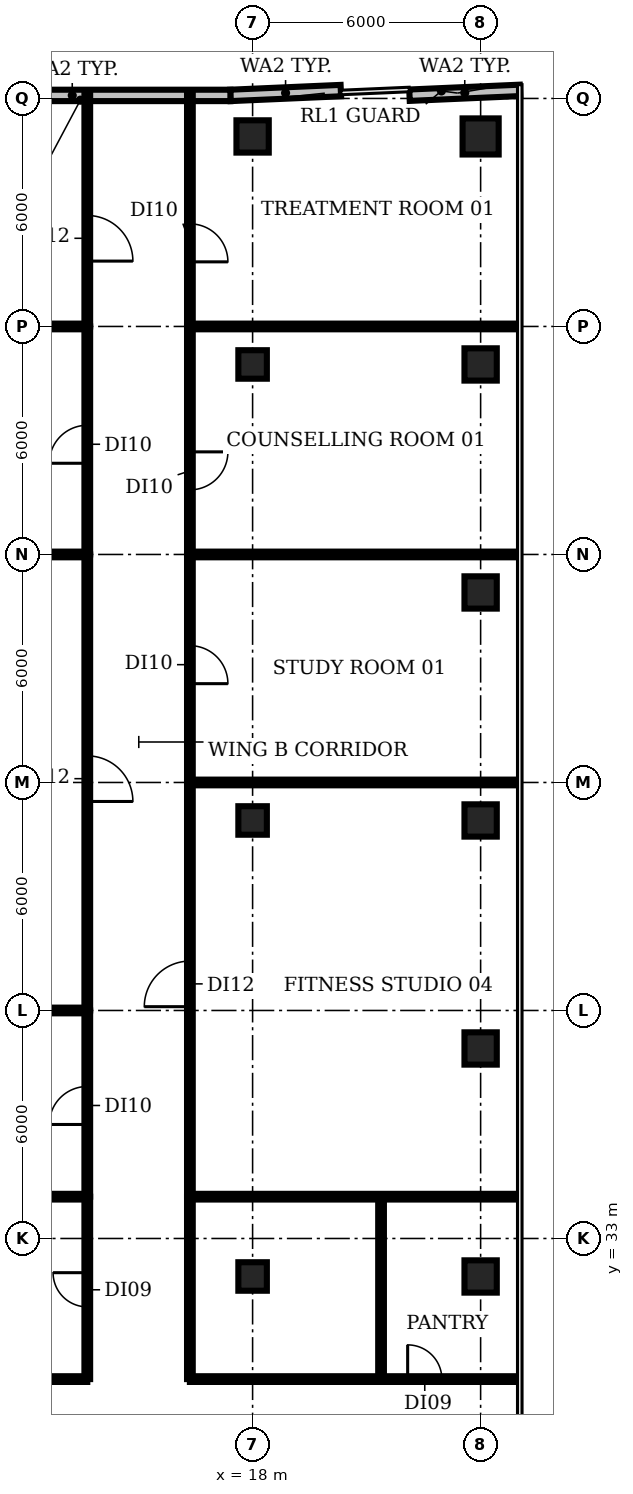
"""IFC4 building model, lengths in metres.
Left out: names, types, materials, properties, quantities, classifications, styles, units other than length and angle.
Written with IfcOpenShell. Run it as: python <this file> out.ifc"""

import sys

from ifc_helpers import new_model, si_unit, direction, frame, frame_2d, origin, origin_2d, place, context, subcontext, project, spatial, rectangle, circle, extrude, element, fill, save


model = new_model("IFC4")
c1 = context("Model", 3, precision=1e-05, world=origin(), true_north=direction((0.0, 1.0)))
c2 = subcontext(c1, "Body", "Model", "MODEL_VIEW")
j1 = project(units=[si_unit("LENGTHUNIT", "METRE"), si_unit("PLANEANGLEUNIT", "RADIAN")], contexts=[c1])
p1 = place(None, origin())
s1 = spatial("IfcSite", under=j1, at=p1, CompositionType="ELEMENT")
p2 = place(p1, origin())
s2 = spatial("IfcBuilding", under=s1, at=p2, CompositionType="ELEMENT")
p3 = place(p2, frame((0.0, 0.0, 180.2)))
s3 = spatial("IfcBuildingStorey", under=s2, at=p3, CompositionType="ELEMENT", Elevation=180.2)
for number, where, z_axis, x_axis in (
    (1, (18.0, 32.0, 0.0), (0.0, 0.0, 1.0), (1.0, 0.0, 0.0)),
    (2, (18.0, 44.0, 0.0), (0.0, 0.0, 1.0), (1.0, 0.0, 0.0)),
    (3, (18.0, 56.0, 0.0), (0.0, 0.0, 1.0), (1.0, 0.0, 0.0)),
):
    element("IfcColumn", number, at=place(p3, frame(where, z_axis=z_axis, x_axis=x_axis)), inside=s3, PredefinedType="COLUMN", context=c2, shape_type="SweptSolid", body=[
        extrude(rectangle(XDim=0.75, YDim=0.75, at=origin_2d()), origin(), (0.0, 0.0, 1.0), 3.85),
    ])
for number, where, z_axis, x_axis in (
    (4, (18.0, 62.0, 0.0), (0.0, 0.0, 1.0), (1.0, 0.0, 0.0)),
    (5, (24.0, 32.0, 0.0), (0.0, 0.0, 1.0), (1.0, 0.0, 0.0)),
    (6, (24.0, 38.0, 0.0), (0.0, 0.0, 1.0), (1.0, 0.0, 0.0)),
    (7, (24.0, 44.0, 0.0), (0.0, 0.0, 1.0), (1.0, 0.0, 0.0)),
    (8, (24.0, 50.0, 0.0), (0.0, 0.0, 1.0), (1.0, 0.0, 0.0)),
    (9, (24.0, 56.0, 0.0), (0.0, 0.0, 1.0), (1.0, 0.0, 0.0)),
):
    element("IfcColumn", number, at=place(p3, frame(where, z_axis=z_axis, x_axis=x_axis)), inside=s3, PredefinedType="COLUMN", context=c2, shape_type="SweptSolid", body=[
        extrude(rectangle(XDim=0.85, YDim=0.85, at=origin_2d()), origin(), (0.0, 0.0, 1.0), 3.85),
    ])
p4 = place(p3, frame((24.0, 62.0, 0.0), z_axis=(0.0, 0.0, 1.0), x_axis=(1.0, 0.0, 0.0)))
e10 = element("IfcColumn", 10, at=p4, inside=s3, PredefinedType="COLUMN", context=c2, shape_type="SweptSolid", body=[
    extrude(circle(Radius=0.475, at=origin_2d()), origin(), (0.0, 0.0, 1.0), 3.85),
])
p5 = place(p3, frame((25.037, 63.213, 0.0), z_axis=(0.0, 0.0, 1.0), x_axis=(-0.999048387851, -0.043615579018, 0.0)))
e11 = element("IfcWall", 11, at=p5, inside=s3, PredefinedType="SOLIDWALL", context=c2, shape_type="SweptSolid", body=[
    extrude(rectangle(XDim=2.911, YDim=0.3, at=frame_2d((1.455, 0.0))), origin(), (0.0, 0.0, 1.0), 3.85),
])
p6 = place(p3, frame((20.322, 63.207, 0.0), z_axis=(0.0, 0.0, 1.0), x_axis=(-0.999051880213, -0.043535510145, 0.0)))
e12 = element("IfcWall", 12, at=p6, inside=s3, PredefinedType="SOLIDWALL", context=c2, shape_type="SweptSolid", body=[
    extrude(rectangle(XDim=2.91, YDim=0.3, at=frame_2d((1.455, 0.0))), origin(), (0.0, 0.0, 1.0), 3.85),
])
p7 = place(p3, frame((17.416, 63.08, 0.0), z_axis=(0.0, 0.0, 1.0), x_axis=(-1.0, 0.0, 0.0)))
e13 = element("IfcWall", 13, at=p7, inside=s3, PredefinedType="SOLIDWALL", context=c2, shape_type="SweptSolid", body=[
    extrude(rectangle(XDim=8.323, YDim=0.3, at=frame_2d((4.162, 0.0))), origin(), (0.0, 0.0, 1.0), 3.85),
])
p8 = place(p3, frame((-2.33, 57.0, 0.0), z_axis=(0.0, 0.0, 1.0), x_axis=(1.0, 0.0, 0.0)))
e14 = element("IfcWall", 14, at=p8, inside=s3, PredefinedType="PARTITIONING", context=c2, shape_type="SweptSolid", body=[
    extrude(rectangle(XDim=15.98, YDim=0.15, at=frame_2d((7.99, 0.0))), origin(), (0.0, 0.0, 1.0), 2.88),
])
p9 = place(p3, frame((-2.07, 51.0, 0.0), z_axis=(0.0, 0.0, 1.0), x_axis=(1.0, 0.0, 0.0)))
e15 = element("IfcWall", 15, at=p9, inside=s3, PredefinedType="PARTITIONING", context=c2, shape_type="SweptSolid", body=[
    extrude(rectangle(XDim=15.72, YDim=0.15, at=frame_2d((7.86, 0.0))), origin(), (0.0, 0.0, 1.0), 2.88),
])
p10 = place(p3, frame((-1.55, 39.0, 0.0), z_axis=(0.0, 0.0, 1.0), x_axis=(1.0, 0.0, 0.0)))
e16 = element("IfcWall", 16, at=p10, inside=s3, PredefinedType="PARTITIONING", context=c2, shape_type="SweptSolid", body=[
    extrude(rectangle(XDim=15.2, YDim=0.15, at=frame_2d((7.6, 0.0))), origin(), (0.0, 0.0, 1.0), 2.88),
])
p11 = place(p3, frame((-1.33, 34.1, 0.0), z_axis=(0.0, 0.0, 1.0), x_axis=(1.0, 0.0, 0.0)))
e17 = element("IfcWall", 17, at=p11, inside=s3, PredefinedType="PARTITIONING", context=c2, shape_type="SweptSolid", body=[
    extrude(rectangle(XDim=14.98, YDim=0.15, at=frame_2d((7.49, 0.0))), origin(), (0.0, 0.0, 1.0), 2.88),
])
p12 = place(p3, frame((8.8, 29.3, 0.0), z_axis=(0.0, 0.0, 1.0), x_axis=(1.0, 0.0, 0.0)))
e18 = element("IfcWall", 18, at=p12, inside=s3, PredefinedType="PARTITIONING", context=c2, shape_type="SweptSolid", body=[
    extrude(rectangle(XDim=4.85, YDim=0.15, at=frame_2d((2.425, 0.0))), origin(), (0.0, 0.0, 1.0), 2.88),
])
p13 = place(p3, frame((13.65, 29.3, 0.0), z_axis=(0.0, 0.0, 1.0), x_axis=(0.0, 1.0, 0.0)))
e19 = element("IfcWall", 19, at=p13, inside=s3, PredefinedType="PARTITIONING", context=c2, shape_type="SweptSolid", body=[
    extrude(rectangle(XDim=4.8, YDim=0.15, at=frame_2d((2.4, 0.0))), origin(), (0.0, 0.0, 1.0), 2.88),
])
p14 = place(p13, frame((1.9, 0.0, 0.0)))
e20 = element("IfcOpeningElement", 20, at=p14, cuts=e19, PredefinedType="OPENING", context=c2, shape_type="SweptSolid", body=[
    extrude(rectangle(XDim=0.9, YDim=2.1, at=frame_2d((0.45, 1.05))), frame((0.0, 0.085, 0.0), z_axis=(0.0, -1.0, 0.0), x_axis=(1.0, 0.0, 0.0)), (0.0, 0.0, 1.0), 0.17),
])
p15 = place(p3, frame((13.65, 34.1, 0.0), z_axis=(0.0, 0.0, 1.0), x_axis=(0.0, 1.0, 0.0)))
e21 = element("IfcWall", 21, at=p15, inside=s3, PredefinedType="PARTITIONING", context=c2, shape_type="SweptSolid", body=[
    extrude(rectangle(XDim=4.9, YDim=0.15, at=frame_2d((2.45, 0.0))), origin(), (0.0, 0.0, 1.0), 2.88),
])
p16 = place(p15, frame((1.9, 0.0, 0.0)))
e22 = element("IfcOpeningElement", 22, at=p16, cuts=e21, PredefinedType="OPENING", context=c2, shape_type="SweptSolid", body=[
    extrude(rectangle(XDim=1.0, YDim=2.1, at=frame_2d((0.5, 1.05))), frame((0.0, 0.085, 0.0), z_axis=(0.0, -1.0, 0.0), x_axis=(1.0, 0.0, 0.0)), (0.0, 0.0, 1.0), 0.17),
])
p17 = place(p3, frame((13.65, 51.0, 0.0), z_axis=(0.0, 0.0, 1.0), x_axis=(0.0, -1.0, 0.0)))
e23 = element("IfcWall", 23, at=p17, inside=s3, PredefinedType="PARTITIONING", context=c2, shape_type="SweptSolid", body=[
    extrude(rectangle(XDim=12.0, YDim=0.15, at=frame_2d((6.0, 0.0))), origin(), (0.0, 0.0, 1.0), 2.88),
])
p18 = place(p17, frame((5.3, 0.0, 0.0)))
e24 = element("IfcOpeningElement", 24, at=p18, cuts=e23, PredefinedType="OPENING", context=c2, shape_type="SweptSolid", body=[
    extrude(rectangle(XDim=1.2, YDim=2.1, at=frame_2d((0.6, 1.05))), frame((0.0, 0.085, 0.0), z_axis=(0.0, -1.0, 0.0), x_axis=(1.0, 0.0, 0.0)), (0.0, 0.0, 1.0), 0.17),
])
p19 = place(p3, frame((13.65, 51.0, 0.0), z_axis=(0.0, 0.0, 1.0), x_axis=(0.0, 1.0, 0.0)))
e25 = element("IfcWall", 25, at=p19, inside=s3, PredefinedType="PARTITIONING", context=c2, shape_type="SweptSolid", body=[
    extrude(rectangle(XDim=6.0, YDim=0.15, at=frame_2d((3.0, 0.0))), origin(), (0.0, 0.0, 1.0), 2.88),
])
p20 = place(p19, frame((2.4, 0.0, 0.0)))
e26 = element("IfcOpeningElement", 26, at=p20, cuts=e25, PredefinedType="OPENING", context=c2, shape_type="SweptSolid", body=[
    extrude(rectangle(XDim=1.0, YDim=2.1, at=frame_2d((0.5, 1.05))), frame((0.0, 0.085, 0.0), z_axis=(0.0, -1.0, 0.0), x_axis=(1.0, 0.0, 0.0)), (0.0, 0.0, 1.0), 0.17),
])
p21 = place(p3, frame((13.65, 63.09, 0.0), z_axis=(0.0, 0.0, 1.0), x_axis=(0.0, -1.0, 0.0)))
e27 = element("IfcWall", 27, at=p21, inside=s3, PredefinedType="PARTITIONING", context=c2, shape_type="SweptSolid", body=[
    extrude(rectangle(XDim=6.09, YDim=0.15, at=frame_2d((3.045, 0.0))), origin(), (0.0, 0.0, 1.0), 2.88),
])
p22 = place(p21, frame((3.17, 0.0, 0.0)))
e28 = element("IfcOpeningElement", 28, at=p22, cuts=e27, PredefinedType="OPENING", context=c2, shape_type="SweptSolid", body=[
    extrude(rectangle(XDim=1.2, YDim=2.1, at=frame_2d((0.6, 1.05))), frame((0.0, 0.085, 0.0), z_axis=(0.0, -1.0, 0.0), x_axis=(1.0, 0.0, 0.0)), (0.0, 0.0, 1.0), 0.17),
])
p23 = place(p3, frame((16.35, 29.3, 0.0), z_axis=(0.0, 0.0, 1.0), x_axis=(0.0, 1.0, 0.0)))
e29 = element("IfcWall", 29, at=p23, inside=s3, PredefinedType="PARTITIONING", context=c2, shape_type="SweptSolid", body=[
    extrude(rectangle(XDim=4.8, YDim=0.15, at=frame_2d((2.4, 0.0))), origin(), (0.0, 0.0, 1.0), 2.88),
])
p24 = place(p3, frame((16.35, 29.3, 0.0), z_axis=(0.0, 0.0, 1.0), x_axis=(1.0, 0.0, 0.0)))
e30 = element("IfcWall", 30, at=p24, inside=s3, PredefinedType="PARTITIONING", context=c2, shape_type="SweptSolid", body=[
    extrude(rectangle(XDim=5.03, YDim=0.15, at=frame_2d((2.515, 0.0))), origin(), (0.0, 0.0, 1.0), 2.88),
])
p25 = place(p3, frame((16.35, 34.1, 0.0), z_axis=(0.0, 0.0, 1.0), x_axis=(0.0, 1.0, 0.0)))
e31 = element("IfcWall", 31, at=p25, inside=s3, PredefinedType="PARTITIONING", context=c2, shape_type="SweptSolid", body=[
    extrude(rectangle(XDim=10.9, YDim=0.15, at=frame_2d((5.45, 0.0))), origin(), (0.0, 0.0, 1.0), 2.88),
])
p26 = place(p25, frame((5.0, 0.0, 0.0)))
e32 = element("IfcOpeningElement", 32, at=p26, cuts=e31, PredefinedType="OPENING", context=c2, shape_type="SweptSolid", body=[
    extrude(rectangle(XDim=1.2, YDim=2.1, at=frame_2d((0.6, 1.05))), frame((0.0, 0.085, 0.0), z_axis=(0.0, -1.0, 0.0), x_axis=(1.0, 0.0, 0.0)), (0.0, 0.0, 1.0), 0.17),
])
p27 = place(p3, frame((16.35, 34.1, 0.0), z_axis=(0.0, 0.0, 1.0), x_axis=(1.0, 0.0, 0.0)))
e33 = element("IfcWall", 33, at=p27, inside=s3, PredefinedType="PARTITIONING", context=c2, shape_type="SweptSolid", body=[
    extrude(rectangle(XDim=8.63, YDim=0.15, at=frame_2d((4.315, 0.0))), origin(), (0.0, 0.0, 1.0), 2.88),
])
p28 = place(p3, frame((16.35, 45.0, 0.0), z_axis=(0.0, 0.0, 1.0), x_axis=(1.0, 0.0, 0.0)))
e34 = element("IfcWall", 34, at=p28, inside=s3, PredefinedType="PARTITIONING", context=c2, shape_type="SweptSolid", body=[
    extrude(rectangle(XDim=8.615, YDim=0.15, at=frame_2d((4.308, 0.0))), origin(), (0.0, 0.0, 1.0), 2.88),
])
p29 = place(p3, frame((16.35, 51.0, 0.0), z_axis=(0.0, 0.0, 1.0), x_axis=(0.0, -1.0, 0.0)))
e35 = element("IfcWall", 35, at=p29, inside=s3, PredefinedType="PARTITIONING", context=c2, shape_type="SweptSolid", body=[
    extrude(rectangle(XDim=6.0, YDim=0.15, at=frame_2d((3.0, 0.0))), origin(), (0.0, 0.0, 1.0), 2.88),
])
p30 = place(p29, frame((2.4, 0.0, 0.0)))
e36 = element("IfcOpeningElement", 36, at=p30, cuts=e35, PredefinedType="OPENING", context=c2, shape_type="SweptSolid", body=[
    extrude(rectangle(XDim=1.0, YDim=2.1, at=frame_2d((0.5, 1.05))), frame((0.0, 0.085, 0.0), z_axis=(0.0, -1.0, 0.0), x_axis=(1.0, 0.0, 0.0)), (0.0, 0.0, 1.0), 0.17),
])
p31 = place(p3, frame((16.35, 51.0, 0.0), z_axis=(0.0, 0.0, 1.0), x_axis=(1.0, 0.0, 0.0)))
e37 = element("IfcWall", 37, at=p31, inside=s3, PredefinedType="PARTITIONING", context=c2, shape_type="SweptSolid", body=[
    extrude(rectangle(XDim=8.63, YDim=0.15, at=frame_2d((4.315, 0.0))), origin(), (0.0, 0.0, 1.0), 2.88),
])
p32 = place(p3, frame((16.35, 57.0, 0.0), z_axis=(0.0, 0.0, 1.0), x_axis=(0.0, -1.0, 0.0)))
e38 = element("IfcWall", 38, at=p32, inside=s3, PredefinedType="PARTITIONING", context=c2, shape_type="SweptSolid", body=[
    extrude(rectangle(XDim=6.0, YDim=0.15, at=frame_2d((3.0, 0.0))), origin(), (0.0, 0.0, 1.0), 2.88),
])
p33 = place(p32, frame((3.3, 0.0, 0.0)))
e39 = element("IfcOpeningElement", 39, at=p33, cuts=e38, PredefinedType="OPENING", context=c2, shape_type="SweptSolid", body=[
    extrude(rectangle(XDim=1.0, YDim=2.1, at=frame_2d((0.5, 1.05))), frame((0.0, 0.085, 0.0), z_axis=(0.0, -1.0, 0.0), x_axis=(1.0, 0.0, 0.0)), (0.0, 0.0, 1.0), 0.17),
])
p34 = place(p3, frame((16.35, 57.0, 0.0), z_axis=(0.0, 0.0, 1.0), x_axis=(1.0, 0.0, 0.0)))
e40 = element("IfcWall", 40, at=p34, inside=s3, PredefinedType="PARTITIONING", context=c2, shape_type="SweptSolid", body=[
    extrude(rectangle(XDim=8.63, YDim=0.15, at=frame_2d((4.315, 0.0))), origin(), (0.0, 0.0, 1.0), 2.88),
])
p35 = place(p3, frame((16.35, 63.09, 0.0), z_axis=(0.0, 0.0, 1.0), x_axis=(0.0, -1.0, 0.0)))
e41 = element("IfcWall", 41, at=p35, inside=s3, PredefinedType="PARTITIONING", context=c2, shape_type="SweptSolid", body=[
    extrude(rectangle(XDim=6.09, YDim=0.15, at=frame_2d((3.045, 0.0))), origin(), (0.0, 0.0, 1.0), 2.88),
])
p36 = place(p35, frame((3.39, 0.0, 0.0)))
e42 = element("IfcOpeningElement", 42, at=p36, cuts=e41, PredefinedType="OPENING", context=c2, shape_type="SweptSolid", body=[
    extrude(rectangle(XDim=1.0, YDim=2.1, at=frame_2d((0.5, 1.05))), frame((0.0, 0.085, 0.0), z_axis=(0.0, -1.0, 0.0), x_axis=(1.0, 0.0, 0.0)), (0.0, 0.0, 1.0), 0.17),
])
p37 = place(p3, frame((21.38, 29.3, 0.0), z_axis=(0.0, 0.0, 1.0), x_axis=(0.0, 1.0, 0.0)))
e43 = element("IfcWall", 43, at=p37, inside=s3, PredefinedType="PARTITIONING", context=c2, shape_type="SweptSolid", body=[
    extrude(rectangle(XDim=4.8, YDim=0.15, at=frame_2d((2.4, 0.0))), origin(), (0.0, 0.0, 1.0), 2.88),
])
p38 = place(p3, frame((21.38, 29.3, 0.0), z_axis=(0.0, 0.0, 1.0), x_axis=(1.0, 0.0, 0.0)))
e44 = element("IfcWall", 44, at=p38, inside=s3, PredefinedType="PARTITIONING", context=c2, shape_type="SweptSolid", body=[
    extrude(rectangle(XDim=3.6, YDim=0.15, at=frame_2d((1.8, 0.0))), origin(), (0.0, 0.0, 1.0), 2.88),
])
p39 = place(p38, frame((0.7, 0.0, 0.0)))
e45 = element("IfcOpeningElement", 45, at=p39, cuts=e44, PredefinedType="OPENING", context=c2, shape_type="SweptSolid", body=[
    extrude(rectangle(XDim=0.9, YDim=2.1, at=frame_2d((0.45, 1.05))), frame((0.0, 0.085, 0.0), z_axis=(0.0, -1.0, 0.0), x_axis=(1.0, 0.0, 0.0)), (0.0, 0.0, 1.0), 0.17),
])
p40 = place(p14, origin())
e46 = element("IfcDoor", 46, at=p40, inside=s3, OperationType="SINGLE_SWING_RIGHT", PredefinedType="DOOR", context=c2, shape_type="SweptSolid", body=[
    extrude(rectangle(XDim=0.9, YDim=2.1, at=frame_2d((0.45, 1.05))), frame((0.0, 0.025, 0.0), z_axis=(0.0, -1.0, 0.0), x_axis=(1.0, 0.0, 0.0)), (0.0, 0.0, 1.0), 0.05),
])
fill(e20, e46)
p41 = place(p16, origin())
e47 = element("IfcDoor", 47, at=p41, inside=s3, OperationType="SINGLE_SWING_LEFT", PredefinedType="DOOR", context=c2, shape_type="SweptSolid", body=[
    extrude(rectangle(XDim=1.0, YDim=2.1, at=frame_2d((0.5, 1.05))), frame((0.0, 0.025, 0.0), z_axis=(0.0, -1.0, 0.0), x_axis=(1.0, 0.0, 0.0)), (0.0, 0.0, 1.0), 0.05),
])
fill(e22, e47)
p42 = place(p18, origin())
e48 = element("IfcDoor", 48, at=p42, inside=s3, OperationType="SINGLE_SWING_RIGHT", PredefinedType="DOOR", context=c2, shape_type="SweptSolid", body=[
    extrude(rectangle(XDim=1.2, YDim=2.1, at=frame_2d((0.6, 1.05))), frame((0.0, 0.025, 0.0), z_axis=(0.0, -1.0, 0.0), x_axis=(1.0, 0.0, 0.0)), (0.0, 0.0, 1.0), 0.05),
])
fill(e24, e48)
p43 = place(p20, origin())
e49 = element("IfcDoor", 49, at=p43, inside=s3, OperationType="SINGLE_SWING_LEFT", PredefinedType="DOOR", context=c2, shape_type="SweptSolid", body=[
    extrude(rectangle(XDim=1.0, YDim=2.1, at=frame_2d((0.5, 1.05))), frame((0.0, 0.025, 0.0), z_axis=(0.0, -1.0, 0.0), x_axis=(1.0, 0.0, 0.0)), (0.0, 0.0, 1.0), 0.05),
])
fill(e26, e49)
p44 = place(p22, origin())
e50 = element("IfcDoor", 50, at=p44, inside=s3, OperationType="SINGLE_SWING_RIGHT", PredefinedType="DOOR", context=c2, shape_type="SweptSolid", body=[
    extrude(rectangle(XDim=1.2, YDim=2.1, at=frame_2d((0.6, 1.05))), frame((0.0, 0.025, 0.0), z_axis=(0.0, -1.0, 0.0), x_axis=(1.0, 0.0, 0.0)), (0.0, 0.0, 1.0), 0.05),
])
fill(e28, e50)
p45 = place(p26, origin())
e51 = element("IfcDoor", 51, at=p45, inside=s3, OperationType="SINGLE_SWING_LEFT", PredefinedType="DOOR", context=c2, shape_type="SweptSolid", body=[
    extrude(rectangle(XDim=1.2, YDim=2.1, at=frame_2d((0.6, 1.05))), frame((0.0, 0.025, 0.0), z_axis=(0.0, -1.0, 0.0), x_axis=(1.0, 0.0, 0.0)), (0.0, 0.0, 1.0), 0.05),
])
fill(e32, e51)
p46 = place(p30, origin())
e52 = element("IfcDoor", 52, at=p46, inside=s3, OperationType="SINGLE_SWING_RIGHT", PredefinedType="DOOR", context=c2, shape_type="SweptSolid", body=[
    extrude(rectangle(XDim=1.0, YDim=2.1, at=frame_2d((0.5, 1.05))), frame((0.0, 0.025, 0.0), z_axis=(0.0, -1.0, 0.0), x_axis=(1.0, 0.0, 0.0)), (0.0, 0.0, 1.0), 0.05),
])
fill(e36, e52)
p47 = place(p33, origin())
e53 = element("IfcDoor", 53, at=p47, inside=s3, OperationType="SINGLE_SWING_LEFT", PredefinedType="DOOR", context=c2, shape_type="SweptSolid", body=[
    extrude(rectangle(XDim=1.0, YDim=2.1, at=frame_2d((0.5, 1.05))), frame((0.0, 0.025, 0.0), z_axis=(0.0, -1.0, 0.0), x_axis=(1.0, 0.0, 0.0)), (0.0, 0.0, 1.0), 0.05),
])
fill(e39, e53)
p48 = place(p36, origin())
e54 = element("IfcDoor", 54, at=p48, inside=s3, OperationType="SINGLE_SWING_RIGHT", PredefinedType="DOOR", context=c2, shape_type="SweptSolid", body=[
    extrude(rectangle(XDim=1.0, YDim=2.1, at=frame_2d((0.5, 1.05))), frame((0.0, 0.025, 0.0), z_axis=(0.0, -1.0, 0.0), x_axis=(1.0, 0.0, 0.0)), (0.0, 0.0, 1.0), 0.05),
])
fill(e42, e54)
p49 = place(p39, origin())
e55 = element("IfcDoor", 55, at=p49, inside=s3, OperationType="SINGLE_SWING_LEFT", PredefinedType="DOOR", context=c2, shape_type="SweptSolid", body=[
    extrude(rectangle(XDim=0.9, YDim=2.1, at=frame_2d((0.45, 1.05))), frame((0.0, 0.025, 0.0), z_axis=(0.0, -1.0, 0.0), x_axis=(1.0, 0.0, 0.0)), (0.0, 0.0, 1.0), 0.05),
])
fill(e45, e55)
save(model, sys.argv[1])
